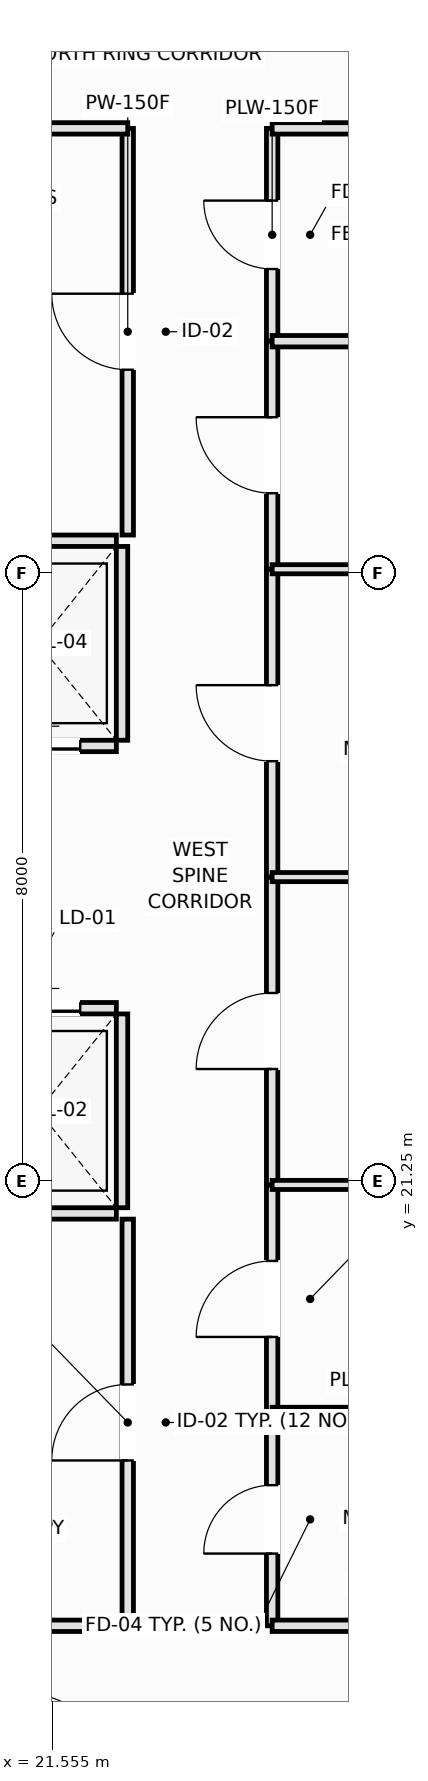
"""IFC4 building model, lengths in metres.
Left out: names, types, materials, properties, quantities, classifications, styles, units other than length and angle.
Written with IfcOpenShell. Run it as: python <this file> out.ifc"""

import sys

from ifc_helpers import new_model, si_unit, direction, frame, frame_2d, origin, place, context, subcontext, project, spatial, rectangle, extrude, element, fill, save


model = new_model("IFC4")
c1 = context("Model", 3, precision=1e-05, world=origin(), true_north=direction((0.0, 1.0)))
c2 = subcontext(c1, "Body", "Model", "MODEL_VIEW")
j1 = project(units=[si_unit("LENGTHUNIT", "METRE"), si_unit("PLANEANGLEUNIT", "RADIAN")], contexts=[c1])
p1 = place(None, origin())
s1 = spatial("IfcSite", under=j1, at=p1, CompositionType="ELEMENT")
p2 = place(p1, origin())
s2 = spatial("IfcBuilding", under=s1, at=p2, CompositionType="ELEMENT")
p3 = place(p2, frame((0.0, 0.0, 85.95)))
s3 = spatial("IfcBuildingStorey", under=s2, at=p3, CompositionType="ELEMENT", Elevation=85.95)
p4 = place(p3, frame((20.35, 20.825, 0.0), z_axis=(0.0, 0.0, 1.0), x_axis=(1.0, 0.0, 0.0)))
e1 = element("IfcWall", 1, at=p4, inside=s3, PredefinedType="PARTITIONING", context=c2, shape_type="SweptSolid", body=[
    extrude(rectangle(XDim=2.05, YDim=0.15, at=frame_2d((1.025, 0.0))), origin(), (0.0, 0.0, 1.0), 3.37),
])
p5 = place(p3, frame((20.35, 23.525, 0.0), z_axis=(0.0, 0.0, 1.0), x_axis=(1.0, 0.0, 0.0)))
e2 = element("IfcWall", 2, at=p5, inside=s3, PredefinedType="PARTITIONING", context=c2, shape_type="SweptSolid", body=[
    extrude(rectangle(XDim=2.05, YDim=0.15, at=frame_2d((1.025, 0.0))), origin(), (0.0, 0.0, 1.0), 3.37),
])
p6 = place(p5, frame((0.475, 0.0, 0.0)))
e3 = element("IfcOpeningElement", 3, at=p6, cuts=e2, PredefinedType="OPENING", context=c2, shape_type="SweptSolid", body=[
    extrude(rectangle(XDim=1.1, YDim=2.2, at=frame_2d((0.55, 1.1))), frame((0.0, 0.085, 0.0), z_axis=(0.0, -1.0, 0.0), x_axis=(1.0, 0.0, 0.0)), (0.0, 0.0, 1.0), 0.17),
])
p7 = place(p3, frame((22.475, 20.9, 0.0), z_axis=(0.0, 0.0, 1.0), x_axis=(0.0, 1.0, 0.0)))
e4 = element("IfcWall", 4, at=p7, inside=s3, PredefinedType="PARTITIONING", context=c2, shape_type="SweptSolid", body=[
    extrude(rectangle(XDim=2.55, YDim=0.15, at=frame_2d((1.275, 0.0))), origin(), (0.0, 0.0, 1.0), 3.37),
])
p8 = place(p3, frame((20.35, 26.975, 0.0), z_axis=(0.0, 0.0, 1.0), x_axis=(1.0, 0.0, 0.0)))
e5 = element("IfcWall", 5, at=p8, inside=s3, PredefinedType="PARTITIONING", context=c2, shape_type="SweptSolid", body=[
    extrude(rectangle(XDim=2.05, YDim=0.15, at=frame_2d((1.025, 0.0))), origin(), (0.0, 0.0, 1.0), 3.37),
])
p9 = place(p8, frame((0.475, 0.0, 0.0)))
e6 = element("IfcOpeningElement", 6, at=p9, cuts=e5, PredefinedType="OPENING", context=c2, shape_type="SweptSolid", body=[
    extrude(rectangle(XDim=1.1, YDim=2.2, at=frame_2d((0.55, 1.1))), frame((0.0, 0.085, 0.0), z_axis=(0.0, -1.0, 0.0), x_axis=(1.0, 0.0, 0.0)), (0.0, 0.0, 1.0), 0.17),
])
p10 = place(p3, frame((20.35, 29.675, 0.0), z_axis=(0.0, 0.0, 1.0), x_axis=(1.0, 0.0, 0.0)))
e7 = element("IfcWall", 7, at=p10, inside=s3, PredefinedType="PARTITIONING", context=c2, shape_type="SweptSolid", body=[
    extrude(rectangle(XDim=2.05, YDim=0.15, at=frame_2d((1.025, 0.0))), origin(), (0.0, 0.0, 1.0), 3.37),
])
p11 = place(p3, frame((22.475, 27.05, 0.0), z_axis=(0.0, 0.0, 1.0), x_axis=(0.0, 1.0, 0.0)))
e8 = element("IfcWall", 8, at=p11, inside=s3, PredefinedType="PARTITIONING", context=c2, shape_type="SweptSolid", body=[
    extrude(rectangle(XDim=2.55, YDim=0.15, at=frame_2d((1.275, 0.0))), origin(), (0.0, 0.0, 1.0), 3.37),
])
p12 = place(p3, frame((22.55, 15.4, 0.0), z_axis=(0.0, 0.0, 1.0), x_axis=(0.0, 1.0, 0.0)))
e9 = element("IfcWall", 9, at=p12, inside=s3, PredefinedType="PARTITIONING", context=c2, shape_type="SweptSolid", body=[
    extrude(rectangle(XDim=5.35, YDim=0.15, at=frame_2d((2.675, 0.0))), origin(), (0.0, 0.0, 1.0), 3.01),
])
p13 = place(p12, frame((2.175, 0.0, 0.0)))
e10 = element("IfcOpeningElement", 10, at=p13, cuts=e9, PredefinedType="OPENING", context=c2, shape_type="SweptSolid", body=[
    extrude(rectangle(XDim=1.0, YDim=2.15, at=frame_2d((0.5, 1.075))), frame((0.0, 0.085, 0.0), z_axis=(0.0, -1.0, 0.0), x_axis=(1.0, 0.0, 0.0)), (0.0, 0.0, 1.0), 0.17),
])
p14 = place(p3, frame((22.55, 29.75, 0.0), z_axis=(0.0, 0.0, 1.0), x_axis=(0.0, 1.0, 0.0)))
e11 = element("IfcWall", 11, at=p14, inside=s3, PredefinedType="PARTITIONING", context=c2, shape_type="SweptSolid", body=[
    extrude(rectangle(XDim=5.35, YDim=0.15, at=frame_2d((2.675, 0.0))), origin(), (0.0, 0.0, 1.0), 3.01),
])
p15 = place(p14, frame((2.175, 0.0, 0.0)))
e12 = element("IfcOpeningElement", 12, at=p15, cuts=e11, PredefinedType="OPENING", context=c2, shape_type="SweptSolid", body=[
    extrude(rectangle(XDim=1.0, YDim=2.15, at=frame_2d((0.5, 1.075))), frame((0.0, 0.085, 0.0), z_axis=(0.0, -1.0, 0.0), x_axis=(1.0, 0.0, 0.0)), (0.0, 0.0, 1.0), 0.17),
])
p16 = place(p3, frame((24.45, 15.4, 0.0), z_axis=(0.0, 0.0, 1.0), x_axis=(0.0, 1.0, 0.0)))
e13 = element("IfcWall", 13, at=p16, inside=s3, PredefinedType="PLUMBINGWALL", context=c2, shape_type="SweptSolid", body=[
    extrude(rectangle(XDim=2.8, YDim=0.15, at=frame_2d((1.4, 0.0))), origin(), (0.0, 0.0, 1.0), 3.37),
])
p17 = place(p16, frame((0.95, 0.0, 0.0)))
e14 = element("IfcOpeningElement", 14, at=p17, cuts=e13, PredefinedType="OPENING", context=c2, shape_type="SweptSolid", body=[
    extrude(rectangle(XDim=0.9, YDim=2.1, at=frame_2d((0.45, 1.05))), frame((0.0, 0.085, 0.0), z_axis=(0.0, -1.0, 0.0), x_axis=(1.0, 0.0, 0.0)), (0.0, 0.0, 1.0), 0.17),
])
p18 = place(p3, frame((24.45, 32.3, 0.0), z_axis=(0.0, 0.0, 1.0), x_axis=(0.0, 1.0, 0.0)))
e15 = element("IfcWall", 15, at=p18, inside=s3, PredefinedType="PLUMBINGWALL", context=c2, shape_type="SweptSolid", body=[
    extrude(rectangle(XDim=2.8, YDim=0.15, at=frame_2d((1.4, 0.0))), origin(), (0.0, 0.0, 1.0), 3.37),
])
p19 = place(p18, frame((0.95, 0.0, 0.0)))
e16 = element("IfcOpeningElement", 16, at=p19, cuts=e15, PredefinedType="OPENING", context=c2, shape_type="SweptSolid", body=[
    extrude(rectangle(XDim=0.9, YDim=2.1, at=frame_2d((0.45, 1.05))), frame((0.0, 0.085, 0.0), z_axis=(0.0, -1.0, 0.0), x_axis=(1.0, 0.0, 0.0)), (0.0, 0.0, 1.0), 0.17),
])
p20 = place(p3, frame((24.45, 18.2, 0.0), z_axis=(0.0, 0.0, 1.0), x_axis=(0.0, 1.0, 0.0)))
e17 = element("IfcWall", 17, at=p20, inside=s3, PredefinedType="PARTITIONING", context=c2, shape_type="SweptSolid", body=[
    extrude(rectangle(XDim=3.0, YDim=0.15, at=frame_2d((1.5, 0.0))), origin(), (0.0, 0.0, 1.0), 3.37),
])
p21 = place(p20, frame((1.0, 0.0, 0.0)))
e18 = element("IfcOpeningElement", 18, at=p21, cuts=e17, PredefinedType="OPENING", context=c2, shape_type="SweptSolid", body=[
    extrude(rectangle(XDim=1.0, YDim=2.15, at=frame_2d((0.5, 1.075))), frame((0.0, 0.085, 0.0), z_axis=(0.0, -1.0, 0.0), x_axis=(1.0, 0.0, 0.0)), (0.0, 0.0, 1.0), 0.17),
])
p22 = place(p3, frame((24.45, 29.3, 0.0), z_axis=(0.0, 0.0, 1.0), x_axis=(0.0, 1.0, 0.0)))
e19 = element("IfcWall", 19, at=p22, inside=s3, PredefinedType="PARTITIONING", context=c2, shape_type="SweptSolid", body=[
    extrude(rectangle(XDim=3.0, YDim=0.15, at=frame_2d((1.5, 0.0))), origin(), (0.0, 0.0, 1.0), 3.37),
])
p23 = place(p22, frame((1.0, 0.0, 0.0)))
e20 = element("IfcOpeningElement", 20, at=p23, cuts=e19, PredefinedType="OPENING", context=c2, shape_type="SweptSolid", body=[
    extrude(rectangle(XDim=1.0, YDim=2.15, at=frame_2d((0.5, 1.075))), frame((0.0, 0.085, 0.0), z_axis=(0.0, -1.0, 0.0), x_axis=(1.0, 0.0, 0.0)), (0.0, 0.0, 1.0), 0.17),
])
p24 = place(p3, frame((24.45, 21.2, 0.0), z_axis=(0.0, 0.0, 1.0), x_axis=(0.0, 1.0, 0.0)))
e21 = element("IfcWall", 21, at=p24, inside=s3, PredefinedType="PARTITIONING", context=c2, shape_type="SweptSolid", body=[
    extrude(rectangle(XDim=4.05, YDim=0.15, at=frame_2d((2.025, 0.0))), origin(), (0.0, 0.0, 1.0), 3.37),
])
p25 = place(p24, frame((1.525, 0.0, 0.0)))
e22 = element("IfcOpeningElement", 22, at=p25, cuts=e21, PredefinedType="OPENING", context=c2, shape_type="SweptSolid", body=[
    extrude(rectangle(XDim=1.0, YDim=2.15, at=frame_2d((0.5, 1.075))), frame((0.0, 0.085, 0.0), z_axis=(0.0, -1.0, 0.0), x_axis=(1.0, 0.0, 0.0)), (0.0, 0.0, 1.0), 0.17),
])
p26 = place(p3, frame((24.45, 25.25, 0.0), z_axis=(0.0, 0.0, 1.0), x_axis=(0.0, 1.0, 0.0)))
e23 = element("IfcWall", 23, at=p26, inside=s3, PredefinedType="PARTITIONING", context=c2, shape_type="SweptSolid", body=[
    extrude(rectangle(XDim=4.05, YDim=0.15, at=frame_2d((2.025, 0.0))), origin(), (0.0, 0.0, 1.0), 3.37),
])
p27 = place(p26, frame((1.525, 0.0, 0.0)))
e24 = element("IfcOpeningElement", 24, at=p27, cuts=e23, PredefinedType="OPENING", context=c2, shape_type="SweptSolid", body=[
    extrude(rectangle(XDim=1.0, YDim=2.15, at=frame_2d((0.5, 1.075))), frame((0.0, 0.085, 0.0), z_axis=(0.0, -1.0, 0.0), x_axis=(1.0, 0.0, 0.0)), (0.0, 0.0, 1.0), 0.17),
])
p28 = place(p3, frame((19.9, 15.4, 0.0), z_axis=(0.0, 0.0, 1.0), x_axis=(1.0, 0.0, 0.0)))
e25 = element("IfcWall", 25, at=p28, inside=s3, PredefinedType="PARTITIONING", context=c2, shape_type="SweptSolid", body=[
    extrude(rectangle(XDim=2.65, YDim=0.15, at=frame_2d((1.325, 0.0))), origin(), (0.0, 0.0, 1.0), 3.37),
])
p29 = place(p3, frame((24.45, 15.4, 0.0), z_axis=(0.0, 0.0, 1.0), x_axis=(1.0, 0.0, 0.0)))
e26 = element("IfcWall", 26, at=p29, inside=s3, PredefinedType="PLUMBINGWALL", context=c2, shape_type="SweptSolid", body=[
    extrude(rectangle(XDim=2.6, YDim=0.15, at=frame_2d((1.3, 0.0))), origin(), (0.0, 0.0, 1.0), 3.37),
])
p30 = place(p3, frame((19.9, 35.1, 0.0), z_axis=(0.0, 0.0, 1.0), x_axis=(1.0, 0.0, 0.0)))
e27 = element("IfcWall", 27, at=p30, inside=s3, PredefinedType="PARTITIONING", context=c2, shape_type="SweptSolid", body=[
    extrude(rectangle(XDim=2.65, YDim=0.15, at=frame_2d((1.325, 0.0))), origin(), (0.0, 0.0, 1.0), 3.37),
])
for number, where, z_axis, x_axis in (
    (28, (24.45, 35.1, 0.0), (0.0, 0.0, 1.0), (1.0, 0.0, 0.0)),
    (29, (24.45, 18.2, 0.0), (0.0, 0.0, 1.0), (1.0, 0.0, 0.0)),
    (30, (24.45, 32.3, 0.0), (0.0, 0.0, 1.0), (1.0, 0.0, 0.0)),
):
    element("IfcWall", number, at=place(p3, frame(where, z_axis=z_axis, x_axis=x_axis)), inside=s3, PredefinedType="PLUMBINGWALL", context=c2, shape_type="SweptSolid", body=[
        extrude(rectangle(XDim=2.6, YDim=0.15, at=frame_2d((1.3, 0.0))), origin(), (0.0, 0.0, 1.0), 3.37),
    ])
p31 = place(p3, frame((24.45, 21.2, 0.0), z_axis=(0.0, 0.0, 1.0), x_axis=(1.0, 0.0, 0.0)))
e31 = element("IfcWall", 31, at=p31, inside=s3, PredefinedType="PARTITIONING", context=c2, shape_type="SweptSolid", body=[
    extrude(rectangle(XDim=4.95, YDim=0.12, at=frame_2d((2.475, 0.0))), origin(), (0.0, 0.0, 1.0), 3.37),
])
p32 = place(p3, frame((24.45, 29.3, 0.0), z_axis=(0.0, 0.0, 1.0), x_axis=(1.0, 0.0, 0.0)))
e32 = element("IfcWall", 32, at=p32, inside=s3, PredefinedType="PARTITIONING", context=c2, shape_type="SweptSolid", body=[
    extrude(rectangle(XDim=3.05, YDim=0.12, at=frame_2d((1.525, 0.0))), origin(), (0.0, 0.0, 1.0), 3.37),
])
p33 = place(p3, frame((24.45, 25.25, 0.0), z_axis=(0.0, 0.0, 1.0), x_axis=(1.0, 0.0, 0.0)))
e33 = element("IfcWall", 33, at=p33, inside=s3, PredefinedType="PARTITIONING", context=c2, shape_type="SweptSolid", body=[
    extrude(rectangle(XDim=3.05, YDim=0.12, at=frame_2d((1.525, 0.0))), origin(), (0.0, 0.0, 1.0), 2.72),
])
p34 = place(p6, origin())
e34 = element("IfcDoor", 34, at=p34, inside=s3, OperationType="DOUBLE_DOOR_SLIDING", PredefinedType="DOOR", context=c2, shape_type="SweptSolid", body=[
    extrude(rectangle(XDim=1.1, YDim=2.2, at=frame_2d((0.55, 1.1))), frame((0.0, 0.025, 0.0), z_axis=(0.0, -1.0, 0.0), x_axis=(1.0, 0.0, 0.0)), (0.0, 0.0, 1.0), 0.05),
])
fill(e3, e34)
p35 = place(p9, origin())
e35 = element("IfcDoor", 35, at=p35, inside=s3, OperationType="DOUBLE_DOOR_SLIDING", PredefinedType="DOOR", context=c2, shape_type="SweptSolid", body=[
    extrude(rectangle(XDim=1.1, YDim=2.2, at=frame_2d((0.55, 1.1))), frame((0.0, 0.025, 0.0), z_axis=(0.0, -1.0, 0.0), x_axis=(1.0, 0.0, 0.0)), (0.0, 0.0, 1.0), 0.05),
])
fill(e6, e35)
p36 = place(p13, origin())
e36 = element("IfcDoor", 36, at=p36, inside=s3, OperationType="SINGLE_SWING_LEFT", PredefinedType="DOOR", context=c2, shape_type="SweptSolid", body=[
    extrude(rectangle(XDim=1.0, YDim=2.15, at=frame_2d((0.5, 1.075))), frame((0.0, 0.025, 0.0), z_axis=(0.0, -1.0, 0.0), x_axis=(1.0, 0.0, 0.0)), (0.0, 0.0, 1.0), 0.05),
])
fill(e10, e36)
p37 = place(p15, origin())
e37 = element("IfcDoor", 37, at=p37, inside=s3, OperationType="SINGLE_SWING_RIGHT", PredefinedType="DOOR", context=c2, shape_type="SweptSolid", body=[
    extrude(rectangle(XDim=1.0, YDim=2.15, at=frame_2d((0.5, 1.075))), frame((0.0, 0.025, 0.0), z_axis=(0.0, -1.0, 0.0), x_axis=(1.0, 0.0, 0.0)), (0.0, 0.0, 1.0), 0.05),
])
fill(e12, e37)
p38 = place(p17, origin())
e38 = element("IfcDoor", 38, at=p38, inside=s3, OperationType="SINGLE_SWING_LEFT", PredefinedType="DOOR", context=c2, shape_type="SweptSolid", body=[
    extrude(rectangle(XDim=0.9, YDim=2.1, at=frame_2d((0.45, 1.05))), frame((0.0, 0.025, 0.0), z_axis=(0.0, -1.0, 0.0), x_axis=(1.0, 0.0, 0.0)), (0.0, 0.0, 1.0), 0.05),
])
fill(e14, e38)
p39 = place(p19, origin())
e39 = element("IfcDoor", 39, at=p39, inside=s3, OperationType="SINGLE_SWING_RIGHT", PredefinedType="DOOR", context=c2, shape_type="SweptSolid", body=[
    extrude(rectangle(XDim=0.9, YDim=2.1, at=frame_2d((0.45, 1.05))), frame((0.0, 0.025, 0.0), z_axis=(0.0, -1.0, 0.0), x_axis=(1.0, 0.0, 0.0)), (0.0, 0.0, 1.0), 0.05),
])
fill(e16, e39)
p40 = place(p21, origin())
e40 = element("IfcDoor", 40, at=p40, inside=s3, OperationType="SINGLE_SWING_LEFT", PredefinedType="DOOR", context=c2, shape_type="SweptSolid", body=[
    extrude(rectangle(XDim=1.0, YDim=2.15, at=frame_2d((0.5, 1.075))), frame((0.0, 0.025, 0.0), z_axis=(0.0, -1.0, 0.0), x_axis=(1.0, 0.0, 0.0)), (0.0, 0.0, 1.0), 0.05),
])
fill(e18, e40)
p41 = place(p23, origin())
e41 = element("IfcDoor", 41, at=p41, inside=s3, OperationType="SINGLE_SWING_RIGHT", PredefinedType="DOOR", context=c2, shape_type="SweptSolid", body=[
    extrude(rectangle(XDim=1.0, YDim=2.15, at=frame_2d((0.5, 1.075))), frame((0.0, 0.025, 0.0), z_axis=(0.0, -1.0, 0.0), x_axis=(1.0, 0.0, 0.0)), (0.0, 0.0, 1.0), 0.05),
])
fill(e20, e41)
p42 = place(p25, origin())
e42 = element("IfcDoor", 42, at=p42, inside=s3, OperationType="SINGLE_SWING_LEFT", PredefinedType="DOOR", context=c2, shape_type="SweptSolid", body=[
    extrude(rectangle(XDim=1.0, YDim=2.15, at=frame_2d((0.5, 1.075))), frame((0.0, 0.025, 0.0), z_axis=(0.0, -1.0, 0.0), x_axis=(1.0, 0.0, 0.0)), (0.0, 0.0, 1.0), 0.05),
])
fill(e22, e42)
p43 = place(p27, origin())
e43 = element("IfcDoor", 43, at=p43, inside=s3, OperationType="SINGLE_SWING_RIGHT", PredefinedType="DOOR", context=c2, shape_type="SweptSolid", body=[
    extrude(rectangle(XDim=1.0, YDim=2.15, at=frame_2d((0.5, 1.075))), frame((0.0, 0.025, 0.0), z_axis=(0.0, -1.0, 0.0), x_axis=(1.0, 0.0, 0.0)), (0.0, 0.0, 1.0), 0.05),
])
fill(e24, e43)
save(model, sys.argv[1])
